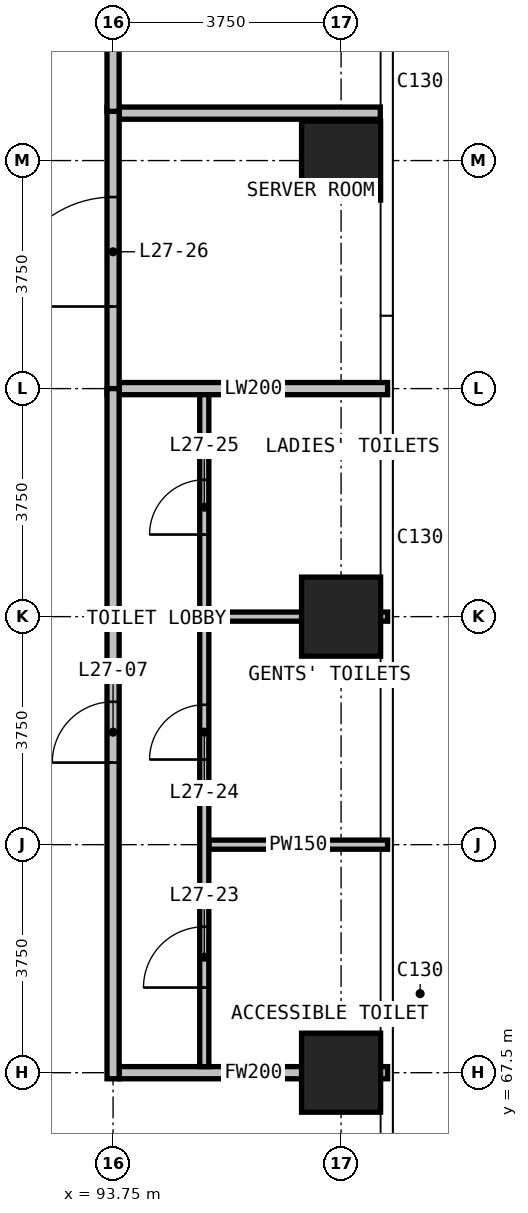
"""IFC4 building model, lengths in metres.
Left out: names, types, materials, properties, quantities, classifications, styles, units other than length and angle.
Written with IfcOpenShell. Run it as: python <this file> out.ifc"""

import sys

from ifc_helpers import new_model, si_unit, direction, frame, frame_2d, origin, origin_2d, place, context, subcontext, project, spatial, rectangle, extrude, element, fill, save


model = new_model("IFC4")
c1 = context("Model", 3, precision=1e-05, world=origin(), true_north=direction((0.0, 1.0)))
c2 = subcontext(c1, "Body", "Model", "MODEL_VIEW")
j1 = project(units=[si_unit("LENGTHUNIT", "METRE"), si_unit("PLANEANGLEUNIT", "RADIAN")], contexts=[c1])
p1 = place(None, origin())
s1 = spatial("IfcSite", under=j1, at=p1, CompositionType="ELEMENT")
p2 = place(p1, origin())
s2 = spatial("IfcBuilding", under=s1, at=p2, CompositionType="ELEMENT")
p3 = place(p2, frame((0.0, 0.0, 110.8)))
s3 = spatial("IfcBuildingStorey", under=s2, at=p3, CompositionType="ELEMENT", Elevation=110.8)
for number, where, z_axis, x_axis in (
    (1, (97.5, 67.5, 0.0), (0.0, 0.0, 1.0), (1.0, 0.0, 0.0)),
    (2, (97.5, 75.0, 0.0), (0.0, 0.0, 1.0), (1.0, 0.0, 0.0)),
    (3, (97.5, 82.5, 0.0), (0.0, 0.0, 1.0), (1.0, 0.0, 0.0)),
):
    element("IfcColumn", number, at=place(p3, frame(where, z_axis=z_axis, x_axis=x_axis)), inside=s3, PredefinedType="COLUMN", context=c2, shape_type="SweptSolid", body=[
        extrude(rectangle(XDim=1.3, YDim=1.3, at=origin_2d()), origin(), (0.0, 0.0, 1.0), 3.6),
    ])
p4 = place(p3, frame((93.85, 78.75, 0.0), z_axis=(0.0, 0.0, 1.0), x_axis=(1.0, 0.0, 0.0)))
e4 = element("IfcWall", 4, at=p4, inside=s3, PredefinedType="PARTITIONING", context=c2, shape_type="SweptSolid", body=[
    extrude(rectangle(XDim=4.415, YDim=0.2, at=frame_2d((2.208, 0.0))), origin(), (0.0, 0.0, 1.0), 3.3),
])
p5 = place(p3, frame((93.85, 83.28, 0.0), z_axis=(0.0, 0.0, 1.0), x_axis=(1.0, 0.0, 0.0)))
e5 = element("IfcWall", 5, at=p5, inside=s3, PredefinedType="PARTITIONING", context=c2, shape_type="SweptSolid", body=[
    extrude(rectangle(XDim=4.295, YDim=0.2, at=frame_2d((2.147, 0.0))), origin(), (0.0, 0.0, 1.0), 3.3),
])
p6 = place(p3, frame((93.75, 78.65, 0.0), z_axis=(0.0, 0.0, 1.0), x_axis=(0.0, 1.0, 0.0)))
e6 = element("IfcWall", 6, at=p6, inside=s3, PredefinedType="PARTITIONING", context=c2, shape_type="SweptSolid", body=[
    extrude(rectangle(XDim=4.73, YDim=0.2, at=frame_2d((2.365, 0.0))), origin(), (0.0, 0.0, 1.0), 3.3),
])
p7 = place(p6, frame((1.45, 0.0, 0.0)))
e7 = element("IfcOpeningElement", 7, at=p7, cuts=e6, PredefinedType="OPENING", context=c2, shape_type="SweptSolid", body=[
    extrude(rectangle(XDim=1.8, YDim=2.4, at=frame_2d((0.9, 1.2))), frame((0.0, 0.11, 0.0), z_axis=(0.0, -1.0, 0.0), x_axis=(1.0, 0.0, 0.0)), (0.0, 0.0, 1.0), 0.22),
])
p8 = place(p3, frame((93.85, 67.5, 0.0), z_axis=(0.0, 0.0, 1.0), x_axis=(1.0, 0.0, 0.0)))
e8 = element("IfcWall", 8, at=p8, inside=s3, PredefinedType="PARTITIONING", context=c2, shape_type="SweptSolid", body=[
    extrude(rectangle(XDim=4.415, YDim=0.2, at=frame_2d((2.208, 0.0))), origin(), (0.0, 0.0, 1.0), 3.3),
])
p9 = place(p3, frame((93.75, 67.4, 0.0), z_axis=(0.0, 0.0, 1.0), x_axis=(0.0, 1.0, 0.0)))
e9 = element("IfcWall", 9, at=p9, inside=s3, PredefinedType="PARTITIONING", context=c2, shape_type="SweptSolid", body=[
    extrude(rectangle(XDim=11.35, YDim=0.2, at=frame_2d((5.675, 0.0))), origin(), (0.0, 0.0, 1.0), 3.3),
])
p10 = place(p9, frame((5.2, 0.0, 0.0)))
e10 = element("IfcOpeningElement", 10, at=p10, cuts=e9, PredefinedType="OPENING", context=c2, shape_type="SweptSolid", body=[
    extrude(rectangle(XDim=1.0, YDim=2.2, at=frame_2d((0.5, 1.1))), frame((0.0, 0.11, 0.0), z_axis=(0.0, -1.0, 0.0), x_axis=(1.0, 0.0, 0.0)), (0.0, 0.0, 1.0), 0.22),
])
p11 = place(p3, frame((93.75, 83.31, 0.0), z_axis=(0.0, 0.0, 1.0), x_axis=(0.0, 1.0, 0.0)))
e11 = element("IfcWall", 11, at=p11, inside=s3, PredefinedType="PARTITIONING", context=c2, shape_type="SweptSolid", body=[
    extrude(rectangle(XDim=7.335, YDim=0.2, at=frame_2d((3.667, 0.0))), origin(), (0.0, 0.0, 1.0), 3.3),
])
for number, where, z_axis, x_axis in (
    (12, (95.325, 71.25, 0.0), (0.0, 0.0, 1.0), (1.0, 0.0, 0.0)),
    (13, (95.325, 75.0, 0.0), (0.0, 0.0, 1.0), (1.0, 0.0, 0.0)),
):
    element("IfcWall", number, at=place(p3, frame(where, z_axis=z_axis, x_axis=x_axis)), inside=s3, PredefinedType="PARTITIONING", context=c2, shape_type="SweptSolid", body=[
        extrude(rectangle(XDim=2.94, YDim=0.15, at=frame_2d((1.47, 0.0))), origin(), (0.0, 0.0, 1.0), 3.3),
    ])
p12 = place(p3, frame((95.25, 67.6, 0.0), z_axis=(0.0, 0.0, 1.0), x_axis=(0.0, 1.0, 0.0)))
e14 = element("IfcWall", 14, at=p12, inside=s3, PredefinedType="PARTITIONING", context=c2, shape_type="SweptSolid", body=[
    extrude(rectangle(XDim=11.05, YDim=0.15, at=frame_2d((5.525, 0.0))), origin(), (0.0, 0.0, 1.0), 3.3),
])
p13 = place(p12, frame((1.3, 0.0, 0.0)))
e15 = element("IfcOpeningElement", 15, at=p13, cuts=e14, PredefinedType="OPENING", context=c2, shape_type="SweptSolid", body=[
    extrude(rectangle(XDim=1.0, YDim=2.2, at=frame_2d((0.5, 1.1))), frame((0.0, 0.085, 0.0), z_axis=(0.0, -1.0, 0.0), x_axis=(1.0, 0.0, 0.0)), (0.0, 0.0, 1.0), 0.17),
])
p14 = place(p12, frame((5.05, 0.0, 0.0)))
e16 = element("IfcOpeningElement", 16, at=p14, cuts=e14, PredefinedType="OPENING", context=c2, shape_type="SweptSolid", body=[
    extrude(rectangle(XDim=0.9, YDim=2.2, at=frame_2d((0.45, 1.1))), frame((0.0, 0.085, 0.0), z_axis=(0.0, -1.0, 0.0), x_axis=(1.0, 0.0, 0.0)), (0.0, 0.0, 1.0), 0.17),
])
p15 = place(p12, frame((8.75, 0.0, 0.0)))
e17 = element("IfcOpeningElement", 17, at=p15, cuts=e14, PredefinedType="OPENING", context=c2, shape_type="SweptSolid", body=[
    extrude(rectangle(XDim=0.9, YDim=2.2, at=frame_2d((0.45, 1.1))), frame((0.0, 0.085, 0.0), z_axis=(0.0, -1.0, 0.0), x_axis=(1.0, 0.0, 0.0)), (0.0, 0.0, 1.0), 0.17),
])
p16 = place(p10, origin())
e18 = element("IfcDoor", 18, at=p16, inside=s3, OperationType="SINGLE_SWING_LEFT", PredefinedType="DOOR", context=c2, shape_type="SweptSolid", body=[
    extrude(rectangle(XDim=1.0, YDim=2.2, at=frame_2d((0.5, 1.1))), frame((0.0, 0.025, 0.0), z_axis=(0.0, -1.0, 0.0), x_axis=(1.0, 0.0, 0.0)), (0.0, 0.0, 1.0), 0.05),
])
fill(e10, e18)
p17 = place(p13, origin())
e19 = element("IfcDoor", 19, at=p17, inside=s3, OperationType="SINGLE_SWING_LEFT", PredefinedType="DOOR", context=c2, shape_type="SweptSolid", body=[
    extrude(rectangle(XDim=1.0, YDim=2.2, at=frame_2d((0.5, 1.1))), frame((0.0, 0.025, 0.0), z_axis=(0.0, -1.0, 0.0), x_axis=(1.0, 0.0, 0.0)), (0.0, 0.0, 1.0), 0.05),
])
fill(e15, e19)
p18 = place(p14, origin())
e20 = element("IfcDoor", 20, at=p18, inside=s3, OperationType="SINGLE_SWING_RIGHT", PredefinedType="DOOR", context=c2, shape_type="SweptSolid", body=[
    extrude(rectangle(XDim=0.9, YDim=2.2, at=frame_2d((0.45, 1.1))), frame((0.0, 0.025, 0.0), z_axis=(0.0, -1.0, 0.0), x_axis=(1.0, 0.0, 0.0)), (0.0, 0.0, 1.0), 0.05),
])
fill(e16, e20)
p19 = place(p15, origin())
e21 = element("IfcDoor", 21, at=p19, inside=s3, OperationType="SINGLE_SWING_LEFT", PredefinedType="DOOR", context=c2, shape_type="SweptSolid", body=[
    extrude(rectangle(XDim=0.9, YDim=2.2, at=frame_2d((0.45, 1.1))), frame((0.0, 0.025, 0.0), z_axis=(0.0, -1.0, 0.0), x_axis=(1.0, 0.0, 0.0)), (0.0, 0.0, 1.0), 0.05),
])
fill(e17, e21)
p20 = place(p7, origin())
e22 = element("IfcDoor", 22, at=p20, inside=s3, OperationType="DOUBLE_DOOR_SINGLE_SWING", PredefinedType="DOOR", context=c2, shape_type="SweptSolid", body=[
    extrude(rectangle(XDim=1.8, YDim=2.4, at=frame_2d((0.9, 1.2))), frame((0.0, 0.025, 0.0), z_axis=(0.0, -1.0, 0.0), x_axis=(1.0, 0.0, 0.0)), (0.0, 0.0, 1.0), 0.05),
])
fill(e7, e22)
save(model, sys.argv[1])
